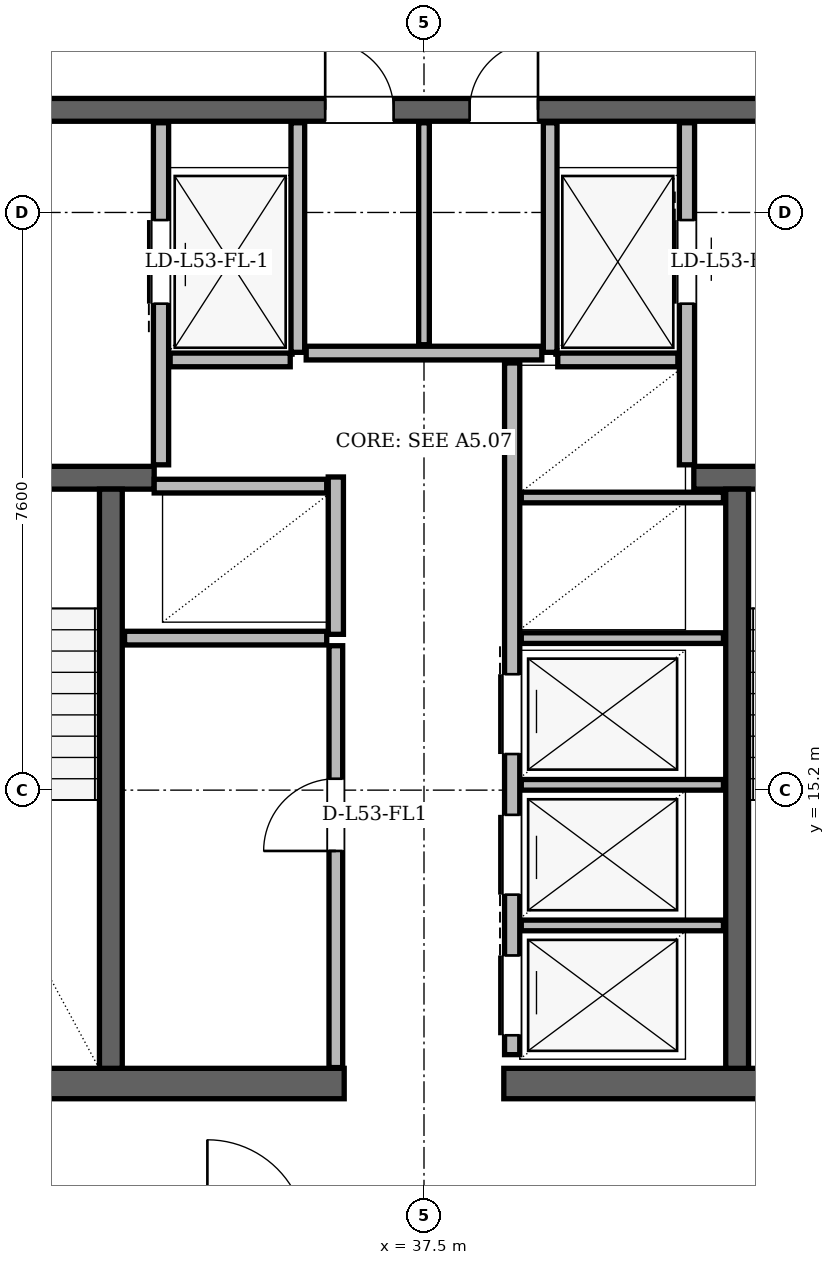
"""IFC4 building model, lengths in metres.
Left out: names, types, materials, properties, quantities, classifications, styles, units other than length and angle.
Written with IfcOpenShell. Run it as: python <this file> out.ifc"""

import sys

from ifc_helpers import new_model, si_unit, direction, frame, frame_2d, origin, place, context, subcontext, project, spatial, rectangle, extrude, element, fill, save


model = new_model("IFC4")
c1 = context("Model", 3, precision=1e-05, world=origin(), true_north=direction((0.0, 1.0)))
c2 = subcontext(c1, "Body", "Model", "MODEL_VIEW")
j1 = project(units=[si_unit("LENGTHUNIT", "METRE"), si_unit("PLANEANGLEUNIT", "RADIAN")], contexts=[c1])
p1 = place(None, origin())
s1 = spatial("IfcSite", under=j1, at=p1, CompositionType="ELEMENT")
p2 = place(p1, origin())
s2 = spatial("IfcBuilding", under=s1, at=p2, CompositionType="ELEMENT")
p3 = place(p2, frame((0.0, 0.0, 201.0)))
s3 = spatial("IfcBuildingStorey", under=s2, at=p3, CompositionType="ELEMENT", Elevation=201.0)
for number, where, z_axis, x_axis in (
    (1, (29.35, 11.34, 0.0), (0.0, 0.0, 1.0), (1.0, 0.0, 0.0)),
    (2, (38.55, 11.34, 0.0), (0.0, 0.0, 1.0), (1.0, 0.0, 0.0)),
):
    element("IfcWall", number, at=place(p3, frame(where, z_axis=z_axis, x_axis=x_axis)), inside=s3, PredefinedType="SHEAR", context=c2, shape_type="SweptSolid", body=[
        extrude(rectangle(XDim=7.1, YDim=0.4, at=frame_2d((3.55, 0.0))), origin(), (0.0, 0.0, 1.0), 3.38),
    ])
p4 = place(p3, frame((29.65, 24.15, 0.0), z_axis=(0.0, 0.0, 1.0), x_axis=(1.0, 0.0, 0.0)))
e3 = element("IfcWall", 3, at=p4, inside=s3, PredefinedType="SHEAR", context=c2, shape_type="SweptSolid", body=[
    extrude(rectangle(XDim=15.7, YDim=0.3, at=frame_2d((7.85, 0.0))), origin(), (0.0, 0.0, 1.0), 3.38),
])
p5 = place(p4, frame((1.7, 0.0, 0.0)))
e4 = element("IfcOpeningElement", 4, at=p5, cuts=e3, PredefinedType="OPENING", context=c2, shape_type="SweptSolid", body=[
    extrude(rectangle(XDim=1.2, YDim=2.2, at=frame_2d((0.6, 1.1))), frame((0.0, 0.15, 0.0), z_axis=(0.0, -1.0, 0.0), x_axis=(1.0, 0.0, 0.0)), (0.0, 0.0, 1.0), 0.3),
])
p6 = place(p4, frame((12.8, 0.0, 0.0)))
e5 = element("IfcOpeningElement", 5, at=p6, cuts=e3, PredefinedType="OPENING", context=c2, shape_type="SweptSolid", body=[
    extrude(rectangle(XDim=1.2, YDim=2.2, at=frame_2d((0.6, 1.1))), frame((0.0, 0.15, 0.0), z_axis=(0.0, -1.0, 0.0), x_axis=(1.0, 0.0, 0.0)), (0.0, 0.0, 1.0), 0.3),
])
p7 = place(p4, frame((6.55, 0.0, 0.0)))
e6 = element("IfcOpeningElement", 6, at=p7, cuts=e3, PredefinedType="OPENING", context=c2, shape_type="SweptSolid", body=[
    extrude(rectangle(XDim=0.9, YDim=2.05, at=frame_2d((0.45, 1.025))), frame((0.0, 0.15, 0.0), z_axis=(0.0, -1.0, 0.0), x_axis=(1.0, 0.0, 0.0)), (0.0, 0.0, 1.0), 0.3),
])
p8 = place(p4, frame((8.45, 0.0, 0.0)))
e7 = element("IfcOpeningElement", 7, at=p8, cuts=e3, PredefinedType="OPENING", context=c2, shape_type="SweptSolid", body=[
    extrude(rectangle(XDim=0.9, YDim=2.05, at=frame_2d((0.45, 1.025))), frame((0.0, 0.15, 0.0), z_axis=(0.0, -1.0, 0.0), x_axis=(1.0, 0.0, 0.0)), (0.0, 0.0, 1.0), 0.3),
])
p9 = place(p3, frame((29.94, 19.31, 0.0), z_axis=(0.0, 0.0, 1.0), x_axis=(1.0, 0.0, 0.0)))
e8 = element("IfcWall", 8, at=p9, inside=s3, PredefinedType="SHEAR", context=c2, shape_type="SweptSolid", body=[
    extrude(rectangle(XDim=4.01, YDim=0.3, at=frame_2d((2.005, 0.0))), origin(), (0.0, 0.0, 1.0), 3.38),
])
p10 = place(p9, frame((1.01, 0.0, 0.0)))
e9 = element("IfcOpeningElement", 9, at=p10, cuts=e8, PredefinedType="OPENING", context=c2, shape_type="SweptSolid", body=[
    extrude(rectangle(XDim=1.4, YDim=2.2, at=frame_2d((0.7, 1.1))), frame((0.0, 0.15, 0.0), z_axis=(0.0, -1.0, 0.0), x_axis=(1.0, 0.0, 0.0)), (0.0, 0.0, 1.0), 0.3),
])
p11 = place(p3, frame((41.05, 19.31, 0.0), z_axis=(0.0, 0.0, 1.0), x_axis=(1.0, 0.0, 0.0)))
e10 = element("IfcWall", 10, at=p11, inside=s3, PredefinedType="SHEAR", context=c2, shape_type="SweptSolid", body=[
    extrude(rectangle(XDim=4.01, YDim=0.3, at=frame_2d((2.005, 0.0))), origin(), (0.0, 0.0, 1.0), 3.38),
])
p12 = place(p11, frame((1.6, 0.0, 0.0)))
e11 = element("IfcOpeningElement", 11, at=p12, cuts=e10, PredefinedType="OPENING", context=c2, shape_type="SweptSolid", body=[
    extrude(rectangle(XDim=1.4, YDim=2.2, at=frame_2d((0.7, 1.1))), frame((0.0, 0.15, 0.0), z_axis=(0.0, -1.0, 0.0), x_axis=(1.0, 0.0, 0.0)), (0.0, 0.0, 1.0), 0.3),
])
for number, where, z_axis, x_axis in (
    (12, (33.38, 11.54, 0.0), (0.0, 0.0, 1.0), (0.0, 1.0, 0.0)),
    (13, (41.62, 11.54, 0.0), (0.0, 0.0, 1.0), (0.0, 1.0, 0.0)),
):
    element("IfcWall", number, at=place(p3, frame(where, z_axis=z_axis, x_axis=x_axis)), inside=s3, PredefinedType="SHEAR", context=c2, shape_type="SweptSolid", body=[
        extrude(rectangle(XDim=7.62, YDim=0.3, at=frame_2d((3.81, 0.0))), origin(), (0.0, 0.0, 1.0), 3.38),
    ])
p13 = place(p3, frame((59.335, 11.719, 0.0), z_axis=(0.0, 0.0, 1.0), x_axis=(-0.500001310321, 0.866024647269, 0.0)))
e14 = element("IfcWall", 14, at=p13, inside=s3, PredefinedType="SOLIDWALL", context=c2, shape_type="SweptSolid", body=[
    extrude(rectangle(XDim=36.352, YDim=0.29, at=frame_2d((18.176, 0.0))), origin(), (0.0, 0.0, 1.0), 2.677),
])
p14 = place(p13, frame((6.579, 0.0, 0.0)))
e15 = element("IfcOpeningElement", 15, at=p14, cuts=e14, PredefinedType="OPENING", context=c2, shape_type="SweptSolid", body=[
    extrude(rectangle(XDim=1.5, YDim=2.2, at=frame_2d((0.75, 1.1))), frame((0.0, 0.145, 0.0), z_axis=(0.0, -1.0, 0.0), x_axis=(1.0, 0.0, 0.0)), (0.0, 0.0, 1.0), 0.29),
])
p15 = place(p13, frame((26.817, 0.0, 0.0)))
e16 = element("IfcOpeningElement", 16, at=p15, cuts=e14, PredefinedType="OPENING", context=c2, shape_type="SweptSolid", body=[
    extrude(rectangle(XDim=1.5, YDim=2.2, at=frame_2d((0.75, 1.1))), frame((0.0, 0.145, 0.0), z_axis=(0.0, -1.0, 0.0), x_axis=(1.0, 0.0, 0.0)), (0.0, 0.0, 1.0), 0.29),
])
p16 = place(p13, frame((34.299, 0.0, 0.85)))
e17 = element("IfcOpeningElement", 17, at=p16, cuts=e14, PredefinedType="OPENING", context=c2, shape_type="SweptSolid", body=[
    extrude(rectangle(XDim=1.2, YDim=1.48, at=frame_2d((0.6, 0.74))), frame((0.0, 0.145, 0.0), z_axis=(0.0, -1.0, 0.0), x_axis=(1.0, 0.0, 0.0)), (0.0, 0.0, 1.0), 0.29),
])
p17 = place(p13, frame((16.249, 0.0, 0.85)))
e18 = element("IfcOpeningElement", 18, at=p17, cuts=e14, PredefinedType="OPENING", context=c2, shape_type="SweptSolid", body=[
    extrude(rectangle(XDim=2.4, YDim=1.717, at=frame_2d((1.2, 0.858))), frame((0.0, 0.145, 0.0), z_axis=(0.0, -1.0, 0.0), x_axis=(1.0, 0.0, 0.0)), (0.0, 0.0, 1.0), 0.29),
])
p18 = place(p13, frame((22.63, 0.0, 0.85)))
e19 = element("IfcOpeningElement", 19, at=p18, cuts=e14, PredefinedType="OPENING", context=c2, shape_type="SweptSolid", body=[
    extrude(rectangle(XDim=1.8, YDim=1.717, at=frame_2d((0.9, 0.858))), frame((0.0, 0.145, 0.0), z_axis=(0.0, -1.0, 0.0), x_axis=(1.0, 0.0, 0.0)), (0.0, 0.0, 1.0), 0.29),
])
p19 = place(p13, frame((32.084, 0.0, 0.85)))
e20 = element("IfcOpeningElement", 20, at=p19, cuts=e14, PredefinedType="OPENING", context=c2, shape_type="SweptSolid", body=[
    extrude(rectangle(XDim=1.6, YDim=1.7, at=frame_2d((0.8, 0.85))), frame((0.0, 0.145, 0.0), z_axis=(0.0, -1.0, 0.0), x_axis=(1.0, 0.0, 0.0)), (0.0, 0.0, 1.0), 0.29),
])
p20 = place(p3, frame((33.841, 43.2, 0.0), z_axis=(0.0, 0.0, 1.0), x_axis=(-0.500001310321, -0.866024647269, 0.0)))
e21 = element("IfcWall", 21, at=p20, inside=s3, PredefinedType="SOLIDWALL", context=c2, shape_type="SweptSolid", body=[
    extrude(rectangle(XDim=36.352, YDim=0.29, at=frame_2d((18.176, 0.0))), origin(), (0.0, 0.0, 1.0), 2.677),
])
p21 = place(p20, frame((6.579, 0.0, 0.0)))
e22 = element("IfcOpeningElement", 22, at=p21, cuts=e21, PredefinedType="OPENING", context=c2, shape_type="SweptSolid", body=[
    extrude(rectangle(XDim=1.5, YDim=2.2, at=frame_2d((0.75, 1.1))), frame((0.0, 0.145, 0.0), z_axis=(0.0, -1.0, 0.0), x_axis=(1.0, 0.0, 0.0)), (0.0, 0.0, 1.0), 0.29),
])
p22 = place(p20, frame((26.818, 0.0, 0.0)))
e23 = element("IfcOpeningElement", 23, at=p22, cuts=e21, PredefinedType="OPENING", context=c2, shape_type="SweptSolid", body=[
    extrude(rectangle(XDim=1.5, YDim=2.2, at=frame_2d((0.75, 1.1))), frame((0.0, 0.145, 0.0), z_axis=(0.0, -1.0, 0.0), x_axis=(1.0, 0.0, 0.0)), (0.0, 0.0, 1.0), 0.29),
])
p23 = place(p20, frame((32.924, 0.0, 0.85)))
e24 = element("IfcOpeningElement", 24, at=p23, cuts=e21, PredefinedType="OPENING", context=c2, shape_type="SweptSolid", body=[
    extrude(rectangle(XDim=1.2, YDim=1.48, at=frame_2d((0.6, 0.74))), frame((0.0, 0.145, 0.0), z_axis=(0.0, -1.0, 0.0), x_axis=(1.0, 0.0, 0.0)), (0.0, 0.0, 1.0), 0.29),
])
p24 = place(p20, frame((21.949, 0.0, 0.85)))
e25 = element("IfcOpeningElement", 25, at=p24, cuts=e21, PredefinedType="OPENING", context=c2, shape_type="SweptSolid", body=[
    extrude(rectangle(XDim=2.0, YDim=1.717, at=frame_2d((1.0, 0.858))), frame((0.0, 0.145, 0.0), z_axis=(0.0, -1.0, 0.0), x_axis=(1.0, 0.0, 0.0)), (0.0, 0.0, 1.0), 0.29),
])
p25 = place(p20, frame((2.823, 0.0, 0.85)))
e26 = element("IfcOpeningElement", 26, at=p25, cuts=e21, PredefinedType="OPENING", context=c2, shape_type="SweptSolid", body=[
    extrude(rectangle(XDim=1.6, YDim=1.7, at=frame_2d((0.8, 0.85))), frame((0.0, 0.145, 0.0), z_axis=(0.0, -1.0, 0.0), x_axis=(1.0, 0.0, 0.0)), (0.0, 0.0, 1.0), 0.29),
])
p26 = place(p20, frame((15.99, 0.0, 0.85)))
e27 = element("IfcOpeningElement", 27, at=p26, cuts=e21, PredefinedType="OPENING", context=c2, shape_type="SweptSolid", body=[
    extrude(rectangle(XDim=3.0, YDim=1.717, at=frame_2d((1.5, 0.858))), frame((0.0, 0.145, 0.0), z_axis=(0.0, -1.0, 0.0), x_axis=(1.0, 0.0, 0.0)), (0.0, 0.0, 1.0), 0.29),
])
p27 = place(p3, frame((34.04, 19.48, 0.0), z_axis=(0.0, 0.0, 1.0), x_axis=(0.0, 1.0, 0.0)))
e28 = element("IfcWall", 28, at=p27, inside=s3, PredefinedType="PARTITIONING", context=c2, shape_type="SweptSolid", body=[
    extrude(rectangle(XDim=4.5, YDim=0.2, at=frame_2d((2.25, 0.0))), origin(), (0.0, 0.0, 1.0), 3.38),
])
p28 = place(p27, frame((2.12, 0.0, 0.0)))
e29 = element("IfcOpeningElement", 29, at=p28, cuts=e28, PredefinedType="OPENING", context=c2, shape_type="SweptSolid", body=[
    extrude(rectangle(XDim=1.1, YDim=2.2, at=frame_2d((0.55, 1.1))), frame((0.0, 0.1, 0.0), z_axis=(0.0, -1.0, 0.0), x_axis=(1.0, 0.0, 0.0)), (0.0, 0.0, 1.0), 0.2),
])
p29 = place(p3, frame((35.84, 20.96, 0.0), z_axis=(0.0, 0.0, 1.0), x_axis=(0.0, 1.0, 0.0)))
e30 = element("IfcWall", 30, at=p29, inside=s3, PredefinedType="PARTITIONING", context=c2, shape_type="SweptSolid", body=[
    extrude(rectangle(XDim=3.02, YDim=0.18, at=frame_2d((1.51, 0.0))), origin(), (0.0, 0.0, 1.0), 3.38),
])
p30 = place(p3, frame((34.16, 20.86, 0.0), z_axis=(0.0, 0.0, 1.0), x_axis=(1.0, 0.0, 0.0)))
e31 = element("IfcWall", 31, at=p30, inside=s3, PredefinedType="PARTITIONING", context=c2, shape_type="SweptSolid", body=[
    extrude(rectangle(XDim=1.58, YDim=0.18, at=frame_2d((0.79, 0.0))), origin(), (0.0, 0.0, 1.0), 3.38),
])
p31 = place(p3, frame((40.96, 19.48, 0.0), z_axis=(0.0, 0.0, 1.0), x_axis=(0.0, 1.0, 0.0)))
e32 = element("IfcWall", 32, at=p31, inside=s3, PredefinedType="PARTITIONING", context=c2, shape_type="SweptSolid", body=[
    extrude(rectangle(XDim=4.5, YDim=0.2, at=frame_2d((2.25, 0.0))), origin(), (0.0, 0.0, 1.0), 3.38),
])
p32 = place(p31, frame((2.12, 0.0, 0.0)))
e33 = element("IfcOpeningElement", 33, at=p32, cuts=e32, PredefinedType="OPENING", context=c2, shape_type="SweptSolid", body=[
    extrude(rectangle(XDim=1.1, YDim=2.2, at=frame_2d((0.55, 1.1))), frame((0.0, 0.1, 0.0), z_axis=(0.0, -1.0, 0.0), x_axis=(1.0, 0.0, 0.0)), (0.0, 0.0, 1.0), 0.2),
])
p33 = place(p3, frame((39.16, 20.96, 0.0), z_axis=(0.0, 0.0, 1.0), x_axis=(0.0, 1.0, 0.0)))
e34 = element("IfcWall", 34, at=p33, inside=s3, PredefinedType="PARTITIONING", context=c2, shape_type="SweptSolid", body=[
    extrude(rectangle(XDim=3.02, YDim=0.18, at=frame_2d((1.51, 0.0))), origin(), (0.0, 0.0, 1.0), 3.38),
])
p34 = place(p3, frame((39.26, 20.86, 0.0), z_axis=(0.0, 0.0, 1.0), x_axis=(1.0, 0.0, 0.0)))
e35 = element("IfcWall", 35, at=p34, inside=s3, PredefinedType="PARTITIONING", context=c2, shape_type="SweptSolid", body=[
    extrude(rectangle(XDim=1.58, YDim=0.18, at=frame_2d((0.79, 0.0))), origin(), (0.0, 0.0, 1.0), 3.38),
])
p35 = place(p3, frame((36.34, 17.25, 0.0), z_axis=(0.0, 0.0, 1.0), x_axis=(0.0, 1.0, 0.0)))
e36 = element("IfcWall", 36, at=p35, inside=s3, PredefinedType="PARTITIONING", context=c2, shape_type="SweptSolid", body=[
    extrude(rectangle(XDim=2.07, YDim=0.2, at=frame_2d((1.035, 0.0))), origin(), (0.0, 0.0, 1.0), 3.38),
])
p36 = place(p3, frame((33.95, 19.2, 0.0), z_axis=(0.0, 0.0, 1.0), x_axis=(1.0, 0.0, 0.0)))
e37 = element("IfcWall", 37, at=p36, inside=s3, PredefinedType="PARTITIONING", context=c2, shape_type="SweptSolid", body=[
    extrude(rectangle(XDim=2.27, YDim=0.18, at=frame_2d((1.135, 0.0))), origin(), (0.0, 0.0, 1.0), 3.38),
])
p37 = place(p3, frame((33.56, 17.2, 0.0), z_axis=(0.0, 0.0, 1.0), x_axis=(1.0, 0.0, 0.0)))
e38 = element("IfcWall", 38, at=p37, inside=s3, PredefinedType="PARTITIONING", context=c2, shape_type="SweptSolid", body=[
    extrude(rectangle(XDim=2.66, YDim=0.18, at=frame_2d((1.33, 0.0))), origin(), (0.0, 0.0, 1.0), 3.38),
])
p38 = place(p3, frame((36.34, 11.55, 0.0), z_axis=(0.0, 0.0, 1.0), x_axis=(0.0, 1.0, 0.0)))
e39 = element("IfcWall", 39, at=p38, inside=s3, PredefinedType="PARTITIONING", context=c2, shape_type="SweptSolid", body=[
    extrude(rectangle(XDim=5.55, YDim=0.18, at=frame_2d((2.775, 0.0))), origin(), (0.0, 0.0, 1.0), 3.38),
])
p39 = place(p38, frame((2.85, 0.0, 0.0)))
e40 = element("IfcOpeningElement", 40, at=p39, cuts=e39, PredefinedType="OPENING", context=c2, shape_type="SweptSolid", body=[
    extrude(rectangle(XDim=0.95, YDim=2.1, at=frame_2d((0.475, 1.05))), frame((0.0, 0.09, 0.0), z_axis=(0.0, -1.0, 0.0), x_axis=(1.0, 0.0, 0.0)), (0.0, 0.0, 1.0), 0.18),
])
p40 = place(p3, frame((38.66, 11.72, 0.0), z_axis=(0.0, 0.0, 1.0), x_axis=(0.0, 1.0, 0.0)))
e41 = element("IfcWall", 41, at=p40, inside=s3, PredefinedType="PARTITIONING", context=c2, shape_type="SweptSolid", body=[
    extrude(rectangle(XDim=9.1, YDim=0.2, at=frame_2d((4.55, 0.0))), origin(), (0.0, 0.0, 1.0), 3.38),
])
p41 = place(p40, frame((0.255, 0.0, 0.0)))
e42 = element("IfcOpeningElement", 42, at=p41, cuts=e41, PredefinedType="OPENING", context=c2, shape_type="SweptSolid", body=[
    extrude(rectangle(XDim=1.05, YDim=2.15, at=frame_2d((0.525, 1.075))), frame((0.0, 0.1, 0.0), z_axis=(0.0, -1.0, 0.0), x_axis=(1.0, 0.0, 0.0)), (0.0, 0.0, 1.0), 0.2),
])
p42 = place(p40, frame((2.105, 0.0, 0.0)))
e43 = element("IfcOpeningElement", 43, at=p42, cuts=e41, PredefinedType="OPENING", context=c2, shape_type="SweptSolid", body=[
    extrude(rectangle(XDim=1.05, YDim=2.15, at=frame_2d((0.525, 1.075))), frame((0.0, 0.1, 0.0), z_axis=(0.0, -1.0, 0.0), x_axis=(1.0, 0.0, 0.0)), (0.0, 0.0, 1.0), 0.2),
])
p43 = place(p40, frame((3.955, 0.0, 0.0)))
e44 = element("IfcOpeningElement", 44, at=p43, cuts=e41, PredefinedType="OPENING", context=c2, shape_type="SweptSolid", body=[
    extrude(rectangle(XDim=1.05, YDim=2.15, at=frame_2d((0.525, 1.075))), frame((0.0, 0.1, 0.0), z_axis=(0.0, -1.0, 0.0), x_axis=(1.0, 0.0, 0.0)), (0.0, 0.0, 1.0), 0.2),
])
for number, where, z_axis, x_axis in (
    (45, (38.78, 13.42, 0.0), (0.0, 0.0, 1.0), (1.0, 0.0, 0.0)),
    (46, (38.78, 15.27, 0.0), (0.0, 0.0, 1.0), (1.0, 0.0, 0.0)),
    (47, (38.78, 17.2, 0.0), (0.0, 0.0, 1.0), (1.0, 0.0, 0.0)),
    (48, (38.78, 19.05, 0.0), (0.0, 0.0, 1.0), (1.0, 0.0, 0.0)),
):
    element("IfcWall", number, at=place(p3, frame(where, z_axis=z_axis, x_axis=x_axis)), inside=s3, PredefinedType="PARTITIONING", context=c2, shape_type="SweptSolid", body=[
        extrude(rectangle(XDim=2.66, YDim=0.14, at=frame_2d((1.33, 0.0))), origin(), (0.0, 0.0, 1.0), 3.38),
    ])
p44 = place(p3, frame((35.95, 20.95, 0.0), z_axis=(0.0, 0.0, 1.0), x_axis=(1.0, 0.0, 0.0)))
e49 = element("IfcWall", 49, at=p44, inside=s3, PredefinedType="PARTITIONING", context=c2, shape_type="SweptSolid", body=[
    extrude(rectangle(XDim=3.1, YDim=0.18, at=frame_2d((1.55, 0.0))), origin(), (0.0, 0.0, 1.0), 3.38),
])
p45 = place(p3, frame((37.5, 21.06, 0.0), z_axis=(0.0, 0.0, 1.0), x_axis=(0.0, 1.0, 0.0)))
e50 = element("IfcWall", 50, at=p45, inside=s3, PredefinedType="PARTITIONING", context=c2, shape_type="SweptSolid", body=[
    extrude(rectangle(XDim=2.92, YDim=0.14, at=frame_2d((1.46, 0.0))), origin(), (0.0, 0.0, 1.0), 3.38),
])
p46 = place(p39, origin())
e51 = element("IfcDoor", 51, at=p46, inside=s3, OperationType="SINGLE_SWING_LEFT", PredefinedType="DOOR", context=c2, shape_type="SweptSolid", body=[
    extrude(rectangle(XDim=0.95, YDim=2.1, at=frame_2d((0.475, 1.05))), frame((0.0, 0.025, 0.0), z_axis=(0.0, -1.0, 0.0), x_axis=(1.0, 0.0, 0.0)), (0.0, 0.0, 1.0), 0.05),
])
fill(e40, e51)
p47 = place(p28, origin())
e52 = element("IfcDoor", 52, at=p47, inside=s3, OperationType="SLIDING_TO_LEFT", PredefinedType="DOOR", context=c2, shape_type="SweptSolid", body=[
    extrude(rectangle(XDim=1.1, YDim=2.2, at=frame_2d((0.55, 1.1))), frame((0.0, 0.025, 0.0), z_axis=(0.0, -1.0, 0.0), x_axis=(1.0, 0.0, 0.0)), (0.0, 0.0, 1.0), 0.05),
])
fill(e29, e52)
p48 = place(p32, origin())
e53 = element("IfcDoor", 53, at=p48, inside=s3, OperationType="SLIDING_TO_RIGHT", PredefinedType="DOOR", context=c2, shape_type="SweptSolid", body=[
    extrude(rectangle(XDim=1.1, YDim=2.2, at=frame_2d((0.55, 1.1))), frame((0.0, 0.025, 0.0), z_axis=(0.0, -1.0, 0.0), x_axis=(1.0, 0.0, 0.0)), (0.0, 0.0, 1.0), 0.05),
])
fill(e33, e53)
p49 = place(p41, origin())
e54 = element("IfcDoor", 54, at=p49, inside=s3, OperationType="SLIDING_TO_RIGHT", PredefinedType="DOOR", context=c2, shape_type="SweptSolid", body=[
    extrude(rectangle(XDim=1.05, YDim=2.15, at=frame_2d((0.525, 1.075))), frame((0.0, 0.025, 0.0), z_axis=(0.0, -1.0, 0.0), x_axis=(1.0, 0.0, 0.0)), (0.0, 0.0, 1.0), 0.05),
])
fill(e42, e54)
p50 = place(p42, origin())
e55 = element("IfcDoor", 55, at=p50, inside=s3, OperationType="SLIDING_TO_LEFT", PredefinedType="DOOR", context=c2, shape_type="SweptSolid", body=[
    extrude(rectangle(XDim=1.05, YDim=2.15, at=frame_2d((0.525, 1.075))), frame((0.0, 0.025, 0.0), z_axis=(0.0, -1.0, 0.0), x_axis=(1.0, 0.0, 0.0)), (0.0, 0.0, 1.0), 0.05),
])
fill(e43, e55)
p51 = place(p43, origin())
e56 = element("IfcDoor", 56, at=p51, inside=s3, OperationType="SLIDING_TO_RIGHT", PredefinedType="DOOR", context=c2, shape_type="SweptSolid", body=[
    extrude(rectangle(XDim=1.05, YDim=2.15, at=frame_2d((0.525, 1.075))), frame((0.0, 0.025, 0.0), z_axis=(0.0, -1.0, 0.0), x_axis=(1.0, 0.0, 0.0)), (0.0, 0.0, 1.0), 0.05),
])
fill(e44, e56)
p52 = place(p7, origin())
e57 = element("IfcDoor", 57, at=p52, inside=s3, OperationType="SINGLE_SWING_LEFT", PredefinedType="DOOR", context=c2, shape_type="SweptSolid", body=[
    extrude(rectangle(XDim=0.9, YDim=2.05, at=frame_2d((0.45, 1.025))), frame((0.0, 0.025, 0.0), z_axis=(0.0, -1.0, 0.0), x_axis=(1.0, 0.0, 0.0)), (0.0, 0.0, 1.0), 0.05),
])
fill(e6, e57)
p53 = place(p8, origin())
e58 = element("IfcDoor", 58, at=p53, inside=s3, OperationType="SINGLE_SWING_RIGHT", PredefinedType="DOOR", context=c2, shape_type="SweptSolid", body=[
    extrude(rectangle(XDim=0.9, YDim=2.05, at=frame_2d((0.45, 1.025))), frame((0.0, 0.025, 0.0), z_axis=(0.0, -1.0, 0.0), x_axis=(1.0, 0.0, 0.0)), (0.0, 0.0, 1.0), 0.05),
])
fill(e7, e58)
save(model, sys.argv[1])
